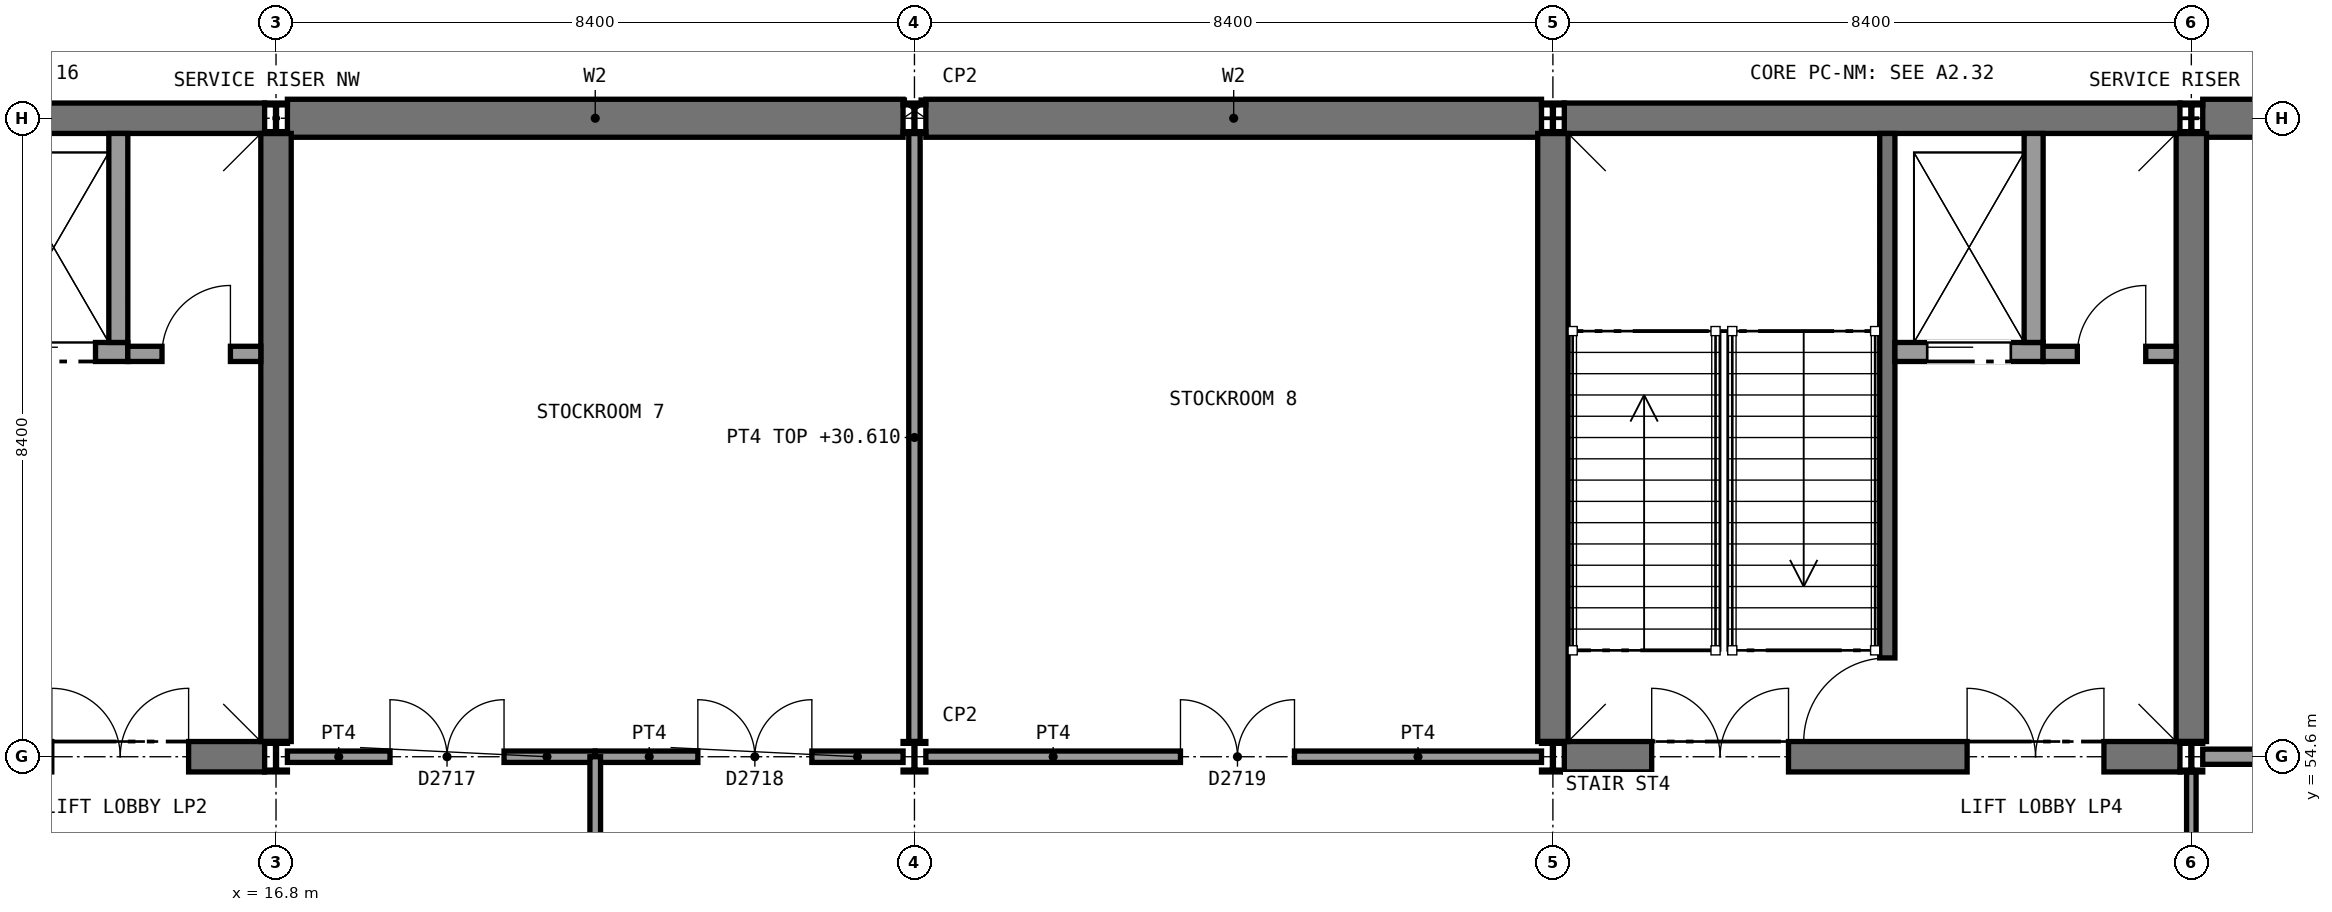
"""IFC4 building model, lengths in metres.
Left out: names, types, materials, properties, quantities, classifications, styles, units other than length and angle.
Written with IfcOpenShell. Run it as: python <this file> out.ifc"""

import sys

from ifc_helpers import new_model, si_unit, direction, frame, frame_2d, origin, origin_2d, place, context, subcontext, project, spatial, rectangle, i_section, extrude, element, fill, save


model = new_model("IFC4")
c1 = context("Model", 3, precision=1e-05, world=origin(), true_north=direction((0.0, 1.0)))
c2 = subcontext(c1, "Body", "Model", "MODEL_VIEW")
j1 = project(units=[si_unit("LENGTHUNIT", "METRE"), si_unit("PLANEANGLEUNIT", "RADIAN")], contexts=[c1])
p1 = place(None, origin())
s1 = spatial("IfcSite", under=j1, at=p1, CompositionType="ELEMENT")
p2 = place(p1, origin())
s2 = spatial("IfcBuilding", under=s1, at=p2, CompositionType="ELEMENT")
p3 = place(p2, frame((0.0, 0.0, 25.8)))
s3 = spatial("IfcBuildingStorey", under=s2, at=p3, CompositionType="ELEMENT", Elevation=25.8)
p4 = place(p3, frame((16.95, 63.0, 0.0), z_axis=(0.0, 0.0, 1.0), x_axis=(1.0, 0.0, 0.0)))
e1 = element("IfcWall", 1, at=p4, inside=s3, PredefinedType="SHEAR", context=c2, shape_type="SweptSolid", body=[
    extrude(rectangle(XDim=8.1, YDim=0.5, at=frame_2d((4.05, 0.0))), origin(), (0.0, 0.0, 1.0), 5.2),
])
p5 = place(p3, frame((25.35, 63.0, 0.0), z_axis=(0.0, 0.0, 1.0), x_axis=(1.0, 0.0, 0.0)))
e2 = element("IfcWall", 2, at=p5, inside=s3, PredefinedType="SHEAR", context=c2, shape_type="SweptSolid", body=[
    extrude(rectangle(XDim=8.1, YDim=0.5, at=frame_2d((4.05, 0.0))), origin(), (0.0, 0.0, 1.0), 5.2),
])
p6 = place(p3, frame((42.15, 63.0, 0.0), z_axis=(0.0, 0.0, 1.0), x_axis=(1.0, 0.0, 0.0)))
e3 = element("IfcWall", 3, at=p6, inside=s3, PredefinedType="SHEAR", context=c2, shape_type="SweptSolid", body=[
    extrude(rectangle(XDim=8.1, YDim=0.5, at=frame_2d((4.05, 0.0))), origin(), (0.0, 0.0, 1.0), 5.2),
])
p7 = place(p3, frame((8.55, 63.0, 0.0), z_axis=(0.0, 0.0, 1.0), x_axis=(1.0, 0.0, 0.0)))
e4 = element("IfcWall", 4, at=p7, inside=s3, PredefinedType="SHEAR", context=c2, shape_type="SweptSolid", body=[
    extrude(rectangle(XDim=8.1, YDim=0.4, at=frame_2d((4.05, 0.0))), origin(), (0.0, 0.0, 1.0), 4.51),
])
p8 = place(p3, frame((8.55, 54.6, 0.0), z_axis=(0.0, 0.0, 1.0), x_axis=(1.0, 0.0, 0.0)))
e5 = element("IfcWall", 5, at=p8, inside=s3, PredefinedType="SHEAR", context=c2, shape_type="SweptSolid", body=[
    extrude(rectangle(XDim=8.1, YDim=0.4, at=frame_2d((4.05, 0.0))), origin(), (0.0, 0.0, 1.0), 4.51),
])
p9 = place(p8, frame((1.15, 0.0, 0.0)))
e6 = element("IfcOpeningElement", 6, at=p9, cuts=e5, PredefinedType="OPENING", context=c2, shape_type="SweptSolid", body=[
    extrude(rectangle(XDim=1.8, YDim=2.1, at=frame_2d((0.9, 1.05))), frame((0.0, 0.21, 0.0), z_axis=(0.0, -1.0, 0.0), x_axis=(1.0, 0.0, 0.0)), (0.0, 0.0, 1.0), 0.42),
])
p10 = place(p8, frame((5.3, 0.0, 0.0)))
e7 = element("IfcOpeningElement", 7, at=p10, cuts=e5, PredefinedType="OPENING", context=c2, shape_type="SweptSolid", body=[
    extrude(rectangle(XDim=1.8, YDim=2.1, at=frame_2d((0.9, 1.05))), frame((0.0, 0.21, 0.0), z_axis=(0.0, -1.0, 0.0), x_axis=(1.0, 0.0, 0.0)), (0.0, 0.0, 1.0), 0.42),
])
p11 = place(p3, frame((16.8, 54.8, 0.0), z_axis=(0.0, 0.0, 1.0), x_axis=(0.0, 1.0, 0.0)))
e8 = element("IfcWall", 8, at=p11, inside=s3, PredefinedType="SHEAR", context=c2, shape_type="SweptSolid", body=[
    extrude(rectangle(XDim=8.0, YDim=0.4, at=frame_2d((4.0, 0.0))), origin(), (0.0, 0.0, 1.0), 5.2),
])
p12 = place(p3, frame((33.75, 63.0, 0.0), z_axis=(0.0, 0.0, 1.0), x_axis=(1.0, 0.0, 0.0)))
e9 = element("IfcWall", 9, at=p12, inside=s3, PredefinedType="SHEAR", context=c2, shape_type="SweptSolid", body=[
    extrude(rectangle(XDim=8.1, YDim=0.4, at=frame_2d((4.05, 0.0))), origin(), (0.0, 0.0, 1.0), 4.51),
])
p13 = place(p3, frame((33.75, 54.6, 0.0), z_axis=(0.0, 0.0, 1.0), x_axis=(1.0, 0.0, 0.0)))
e10 = element("IfcWall", 10, at=p13, inside=s3, PredefinedType="SHEAR", context=c2, shape_type="SweptSolid", body=[
    extrude(rectangle(XDim=8.1, YDim=0.4, at=frame_2d((4.05, 0.0))), origin(), (0.0, 0.0, 1.0), 4.51),
])
p14 = place(p13, frame((1.15, 0.0, 0.0)))
e11 = element("IfcOpeningElement", 11, at=p14, cuts=e10, PredefinedType="OPENING", context=c2, shape_type="SweptSolid", body=[
    extrude(rectangle(XDim=1.8, YDim=2.1, at=frame_2d((0.9, 1.05))), frame((0.0, 0.21, 0.0), z_axis=(0.0, -1.0, 0.0), x_axis=(1.0, 0.0, 0.0)), (0.0, 0.0, 1.0), 0.42),
])
p15 = place(p13, frame((5.3, 0.0, 0.0)))
e12 = element("IfcOpeningElement", 12, at=p15, cuts=e10, PredefinedType="OPENING", context=c2, shape_type="SweptSolid", body=[
    extrude(rectangle(XDim=1.8, YDim=2.1, at=frame_2d((0.9, 1.05))), frame((0.0, 0.21, 0.0), z_axis=(0.0, -1.0, 0.0), x_axis=(1.0, 0.0, 0.0)), (0.0, 0.0, 1.0), 0.42),
])
for number, where, z_axis, x_axis in (
    (13, (33.6, 54.8, 0.0), (0.0, 0.0, 1.0), (0.0, 1.0, 0.0)),
    (14, (42.0, 54.8, 0.0), (0.0, 0.0, 1.0), (0.0, 1.0, 0.0)),
):
    element("IfcWall", number, at=place(p3, frame(where, z_axis=z_axis, x_axis=x_axis)), inside=s3, PredefinedType="SHEAR", context=c2, shape_type="SweptSolid", body=[
        extrude(rectangle(XDim=8.0, YDim=0.4, at=frame_2d((4.0, 0.0))), origin(), (0.0, 0.0, 1.0), 5.2),
    ])
for number, where, z_axis, x_axis in (
    (15, (16.8, 54.6, 0.0), (0.0, 0.0, 1.0), (1.0, 0.0, 0.0)),
    (16, (16.8, 63.0, 0.0), (0.0, 0.0, 1.0), (1.0, 0.0, 0.0)),
    (17, (25.2, 54.6, 0.0), (0.0, 0.0, 1.0), (1.0, 0.0, 0.0)),
    (18, (25.2, 63.0, 0.0), (0.0, 0.0, 1.0), (1.0, 0.0, 0.0)),
    (19, (33.6, 54.6, 0.0), (0.0, 0.0, 1.0), (1.0, 0.0, 0.0)),
    (20, (33.6, 63.0, 0.0), (0.0, 0.0, 1.0), (1.0, 0.0, 0.0)),
    (21, (42.0, 54.6, 0.0), (0.0, 0.0, 1.0), (1.0, 0.0, 0.0)),
    (22, (42.0, 63.0, 0.0), (0.0, 0.0, 1.0), (1.0, 0.0, 0.0)),
):
    element("IfcColumn", number, at=place(p3, frame(where, z_axis=z_axis, x_axis=x_axis)), inside=s3, PredefinedType="COLUMN", context=c2, shape_type="SweptSolid", body=[
        extrude(i_section(OverallWidth=0.3, OverallDepth=0.4, WebThickness=0.013, FlangeThickness=0.024, FilletRadius=0.027, at=origin_2d()), origin(), (0.0, 0.0, 1.0), 5.4),
    ])
p16 = place(p3, frame((25.2, 54.8, 0.0), z_axis=(0.0, 0.0, 1.0), x_axis=(0.0, 1.0, 0.0)))
e23 = element("IfcWall", 23, at=p16, inside=s3, PredefinedType="SOLIDWALL", context=c2, shape_type="SweptSolid", body=[
    extrude(rectangle(XDim=8.0, YDim=0.15, at=frame_2d((4.0, 0.0))), origin(), (0.0, 0.0, 1.0), 4.81),
])
p17 = place(p3, frame((16.95, 54.6, 0.0), z_axis=(0.0, 0.0, 1.0), x_axis=(1.0, 0.0, 0.0)))
e24 = element("IfcWall", 24, at=p17, inside=s3, PredefinedType="SOLIDWALL", context=c2, shape_type="SweptSolid", body=[
    extrude(rectangle(XDim=4.05, YDim=0.15, at=frame_2d((2.025, 0.0))), origin(), (0.0, 0.0, 1.0), 4.89),
])
p18 = place(p17, frame((1.35, 0.0, 0.0)))
e25 = element("IfcOpeningElement", 25, at=p18, cuts=e24, PredefinedType="OPENING", context=c2, shape_type="SweptSolid", body=[
    extrude(rectangle(XDim=1.5, YDim=2.1, at=frame_2d((0.75, 1.05))), frame((0.0, 0.085, 0.0), z_axis=(0.0, -1.0, 0.0), x_axis=(1.0, 0.0, 0.0)), (0.0, 0.0, 1.0), 0.17),
])
p19 = place(p3, frame((21.0, 54.6, 0.0), z_axis=(0.0, 0.0, 1.0), x_axis=(1.0, 0.0, 0.0)))
e26 = element("IfcWall", 26, at=p19, inside=s3, PredefinedType="SOLIDWALL", context=c2, shape_type="SweptSolid", body=[
    extrude(rectangle(XDim=4.05, YDim=0.15, at=frame_2d((2.025, 0.0))), origin(), (0.0, 0.0, 1.0), 4.89),
])
p20 = place(p19, frame((1.35, 0.0, 0.0)))
e27 = element("IfcOpeningElement", 27, at=p20, cuts=e26, PredefinedType="OPENING", context=c2, shape_type="SweptSolid", body=[
    extrude(rectangle(XDim=1.5, YDim=2.1, at=frame_2d((0.75, 1.05))), frame((0.0, 0.085, 0.0), z_axis=(0.0, -1.0, 0.0), x_axis=(1.0, 0.0, 0.0)), (0.0, 0.0, 1.0), 0.17),
])
p21 = place(p3, frame((25.35, 54.6, 0.0), z_axis=(0.0, 0.0, 1.0), x_axis=(1.0, 0.0, 0.0)))
e28 = element("IfcWall", 28, at=p21, inside=s3, PredefinedType="SOLIDWALL", context=c2, shape_type="SweptSolid", body=[
    extrude(rectangle(XDim=8.1, YDim=0.15, at=frame_2d((4.05, 0.0))), origin(), (0.0, 0.0, 1.0), 4.89),
])
p22 = place(p21, frame((3.35, 0.0, 0.0)))
e29 = element("IfcOpeningElement", 29, at=p22, cuts=e28, PredefinedType="OPENING", context=c2, shape_type="SweptSolid", body=[
    extrude(rectangle(XDim=1.5, YDim=2.1, at=frame_2d((0.75, 1.05))), frame((0.0, 0.085, 0.0), z_axis=(0.0, -1.0, 0.0), x_axis=(1.0, 0.0, 0.0)), (0.0, 0.0, 1.0), 0.17),
])
p23 = place(p3, frame((42.15, 54.6, 0.0), z_axis=(0.0, 0.0, 1.0), x_axis=(1.0, 0.0, 0.0)))
e30 = element("IfcWall", 30, at=p23, inside=s3, PredefinedType="SOLIDWALL", context=c2, shape_type="SweptSolid", body=[
    extrude(rectangle(XDim=8.1, YDim=0.2, at=frame_2d((4.05, 0.0))), origin(), (0.0, 0.0, 1.0), 4.89),
])
p24 = place(p23, frame((3.35, 0.0, 0.0)))
e31 = element("IfcOpeningElement", 31, at=p24, cuts=e30, PredefinedType="OPENING", context=c2, shape_type="SweptSolid", body=[
    extrude(rectangle(XDim=1.2, YDim=2.1, at=frame_2d((0.6, 1.05))), frame((0.0, 0.11, 0.0), z_axis=(0.0, -1.0, 0.0), x_axis=(1.0, 0.0, 0.0)), (0.0, 0.0, 1.0), 0.22),
])
p25 = place(p3, frame((21.0, 47.2, 0.0), z_axis=(0.0, 0.0, 1.0), x_axis=(0.0, 1.0, 0.0)))
e32 = element("IfcWall", 32, at=p25, inside=s3, PredefinedType="PARTITIONING", context=c2, shape_type="SweptSolid", body=[
    extrude(rectangle(XDim=7.4, YDim=0.14, at=frame_2d((3.7, 0.0))), origin(), (0.0, 0.0, 1.0), 5.2),
])
p26 = place(p3, frame((42.0, 46.4, 0.0), z_axis=(0.0, 0.0, 1.0), x_axis=(0.0, 1.0, 0.0)))
e33 = element("IfcWall", 33, at=p26, inside=s3, PredefinedType="PARTITIONING", context=c2, shape_type="SweptSolid", body=[
    extrude(rectangle(XDim=8.0, YDim=0.125, at=frame_2d((4.0, 0.0))), origin(), (0.0, 0.0, 1.0), 4.81),
])
p27 = place(p26, frame((3.1, 0.0, 0.0)))
e34 = element("IfcOpeningElement", 34, at=p27, cuts=e33, PredefinedType="OPENING", context=c2, shape_type="SweptSolid", body=[
    extrude(rectangle(XDim=1.8, YDim=2.1, at=frame_2d((0.9, 1.05))), frame((0.0, 0.073, 0.0), z_axis=(0.0, -1.0, 0.0), x_axis=(1.0, 0.0, 0.0)), (0.0, 0.0, 1.0), 0.145),
])
p28 = place(p3, frame((12.9, 59.925, 0.0), z_axis=(0.0, 0.0, 1.0), x_axis=(1.0, 0.0, 0.0)))
e35 = element("IfcWall", 35, at=p28, inside=s3, PredefinedType="SOLIDWALL", context=c2, shape_type="SweptSolid", body=[
    extrude(rectangle(XDim=1.95, YDim=0.25, at=frame_2d((0.975, 0.0))), origin(), (0.0, 0.0, 1.0), 5.2),
])
p29 = place(p28, frame((0.425, 0.0, 0.0)))
e36 = element("IfcOpeningElement", 36, at=p29, cuts=e35, PredefinedType="OPENING", context=c2, shape_type="SweptSolid", body=[
    extrude(rectangle(XDim=1.1, YDim=2.1, at=frame_2d((0.55, 1.05))), frame((0.0, 0.135, 0.0), z_axis=(0.0, -1.0, 0.0), x_axis=(1.0, 0.0, 0.0)), (0.0, 0.0, 1.0), 0.27),
])
p30 = place(p3, frame((14.725, 62.8, 0.0), z_axis=(0.0, 0.0, 1.0), x_axis=(0.0, -1.0, 0.0)))
e37 = element("IfcWall", 37, at=p30, inside=s3, PredefinedType="SOLIDWALL", context=c2, shape_type="SweptSolid", body=[
    extrude(rectangle(XDim=2.75, YDim=0.25, at=frame_2d((1.375, 0.0))), origin(), (0.0, 0.0, 1.0), 5.2),
])
p31 = place(p3, frame((14.85, 59.9, 0.0), z_axis=(0.0, 0.0, 1.0), x_axis=(1.0, 0.0, 0.0)))
e38 = element("IfcWall", 38, at=p31, inside=s3, PredefinedType="PARTITIONING", context=c2, shape_type="SweptSolid", body=[
    extrude(rectangle(XDim=1.75, YDim=0.2, at=frame_2d((0.875, 0.0))), origin(), (0.0, 0.0, 1.0), 5.2),
])
p32 = place(p31, frame((0.45, 0.0, 0.0)))
e39 = element("IfcOpeningElement", 39, at=p32, cuts=e38, PredefinedType="OPENING", context=c2, shape_type="SweptSolid", body=[
    extrude(rectangle(XDim=0.9, YDim=2.1, at=frame_2d((0.45, 1.05))), frame((0.0, 0.11, 0.0), z_axis=(0.0, -1.0, 0.0), x_axis=(1.0, 0.0, 0.0)), (0.0, 0.0, 1.0), 0.22),
])
p33 = place(p3, frame((38.0, 62.8, 0.0), z_axis=(0.0, 0.0, 1.0), x_axis=(0.0, -1.0, 0.0)))
e40 = element("IfcWall", 40, at=p33, inside=s3, PredefinedType="SHEAR", context=c2, shape_type="SweptSolid", body=[
    extrude(rectangle(XDim=8.0, YDim=0.2, at=frame_2d((4.0, 0.0))), origin(), (0.0, 0.0, 1.0), 5.2),
])
p34 = place(p33, frame((6.9, 0.0, 0.0)))
e41 = element("IfcOpeningElement", 41, at=p34, cuts=e40, PredefinedType="OPENING", context=c2, shape_type="SweptSolid", body=[
    extrude(rectangle(XDim=1.11, YDim=2.1, at=frame_2d((0.555, 1.05))), frame((0.0, 0.11, 0.0), z_axis=(0.0, -1.0, 0.0), x_axis=(1.0, 0.0, 0.0)), (0.0, 0.0, 1.0), 0.22),
])
p35 = place(p3, frame((38.1, 59.925, 0.0), z_axis=(0.0, 0.0, 1.0), x_axis=(1.0, 0.0, 0.0)))
e42 = element("IfcWall", 42, at=p35, inside=s3, PredefinedType="SOLIDWALL", context=c2, shape_type="SweptSolid", body=[
    extrude(rectangle(XDim=1.95, YDim=0.25, at=frame_2d((0.975, 0.0))), origin(), (0.0, 0.0, 1.0), 5.2),
])
p36 = place(p35, frame((0.425, 0.0, 0.0)))
e43 = element("IfcOpeningElement", 43, at=p36, cuts=e42, PredefinedType="OPENING", context=c2, shape_type="SweptSolid", body=[
    extrude(rectangle(XDim=1.1, YDim=2.1, at=frame_2d((0.55, 1.05))), frame((0.0, 0.135, 0.0), z_axis=(0.0, -1.0, 0.0), x_axis=(1.0, 0.0, 0.0)), (0.0, 0.0, 1.0), 0.27),
])
p37 = place(p3, frame((39.925, 62.8, 0.0), z_axis=(0.0, 0.0, 1.0), x_axis=(0.0, -1.0, 0.0)))
e44 = element("IfcWall", 44, at=p37, inside=s3, PredefinedType="SOLIDWALL", context=c2, shape_type="SweptSolid", body=[
    extrude(rectangle(XDim=2.75, YDim=0.25, at=frame_2d((1.375, 0.0))), origin(), (0.0, 0.0, 1.0), 5.2),
])
p38 = place(p3, frame((40.05, 59.9, 0.0), z_axis=(0.0, 0.0, 1.0), x_axis=(1.0, 0.0, 0.0)))
e45 = element("IfcWall", 45, at=p38, inside=s3, PredefinedType="PARTITIONING", context=c2, shape_type="SweptSolid", body=[
    extrude(rectangle(XDim=1.75, YDim=0.2, at=frame_2d((0.875, 0.0))), origin(), (0.0, 0.0, 1.0), 5.2),
])
p39 = place(p38, frame((0.45, 0.0, 0.0)))
e46 = element("IfcOpeningElement", 46, at=p39, cuts=e45, PredefinedType="OPENING", context=c2, shape_type="SweptSolid", body=[
    extrude(rectangle(XDim=0.9, YDim=2.1, at=frame_2d((0.45, 1.05))), frame((0.0, 0.11, 0.0), z_axis=(0.0, -1.0, 0.0), x_axis=(1.0, 0.0, 0.0)), (0.0, 0.0, 1.0), 0.22),
])
p40 = place(p18, origin())
e47 = element("IfcDoor", 47, at=p40, inside=s3, OperationType="DOUBLE_DOOR_SINGLE_SWING", PredefinedType="DOOR", context=c2, shape_type="SweptSolid", body=[
    extrude(rectangle(XDim=1.5, YDim=2.1, at=frame_2d((0.75, 1.05))), frame((0.0, 0.025, 0.0), z_axis=(0.0, -1.0, 0.0), x_axis=(1.0, 0.0, 0.0)), (0.0, 0.0, 1.0), 0.05),
])
fill(e25, e47)
p41 = place(p20, origin())
e48 = element("IfcDoor", 48, at=p41, inside=s3, OperationType="DOUBLE_DOOR_SINGLE_SWING", PredefinedType="DOOR", context=c2, shape_type="SweptSolid", body=[
    extrude(rectangle(XDim=1.5, YDim=2.1, at=frame_2d((0.75, 1.05))), frame((0.0, 0.025, 0.0), z_axis=(0.0, -1.0, 0.0), x_axis=(1.0, 0.0, 0.0)), (0.0, 0.0, 1.0), 0.05),
])
fill(e27, e48)
p42 = place(p22, origin())
e49 = element("IfcDoor", 49, at=p42, inside=s3, OperationType="DOUBLE_DOOR_SINGLE_SWING", PredefinedType="DOOR", context=c2, shape_type="SweptSolid", body=[
    extrude(rectangle(XDim=1.5, YDim=2.1, at=frame_2d((0.75, 1.05))), frame((0.0, 0.025, 0.0), z_axis=(0.0, -1.0, 0.0), x_axis=(1.0, 0.0, 0.0)), (0.0, 0.0, 1.0), 0.05),
])
fill(e29, e49)
p43 = place(p29, frame((1.1, 0.0, 0.0), z_axis=(0.0, 0.0, 1.0), x_axis=(-1.0, 0.0, 0.0)))
e50 = element("IfcDoor", 50, at=p43, inside=s3, OperationType="SLIDING_TO_RIGHT", PredefinedType="DOOR", context=c2, shape_type="SweptSolid", body=[
    extrude(rectangle(XDim=1.1, YDim=2.1, at=frame_2d((0.55, 1.05))), frame((0.0, 0.025, 0.0), z_axis=(0.0, -1.0, 0.0), x_axis=(1.0, 0.0, 0.0)), (0.0, 0.0, 1.0), 0.05),
])
fill(e36, e50)
p44 = place(p32, origin())
e51 = element("IfcDoor", 51, at=p44, inside=s3, OperationType="SINGLE_SWING_RIGHT", PredefinedType="DOOR", context=c2, shape_type="SweptSolid", body=[
    extrude(rectangle(XDim=0.9, YDim=2.1, at=frame_2d((0.45, 1.05))), frame((0.0, 0.025, 0.0), z_axis=(0.0, -1.0, 0.0), x_axis=(1.0, 0.0, 0.0)), (0.0, 0.0, 1.0), 0.05),
])
fill(e39, e51)
p45 = place(p10, origin())
e52 = element("IfcDoor", 52, at=p45, inside=s3, OperationType="DOUBLE_DOOR_SINGLE_SWING", PredefinedType="DOOR", context=c2, shape_type="SweptSolid", body=[
    extrude(rectangle(XDim=1.8, YDim=2.1, at=frame_2d((0.9, 1.05))), frame((0.0, 0.025, 0.0), z_axis=(0.0, -1.0, 0.0), x_axis=(1.0, 0.0, 0.0)), (0.0, 0.0, 1.0), 0.05),
])
fill(e7, e52)
p46 = place(p34, frame((1.1, 0.0, 0.0), z_axis=(0.0, 0.0, 1.0), x_axis=(-1.0, 0.0, 0.0)))
e53 = element("IfcDoor", 53, at=p46, inside=s3, OperationType="SINGLE_SWING_LEFT", PredefinedType="DOOR", context=c2, shape_type="SweptSolid", body=[
    extrude(rectangle(XDim=1.1, YDim=2.1, at=frame_2d((0.55, 1.05))), frame((0.0, 0.025, 0.0), z_axis=(0.0, -1.0, 0.0), x_axis=(1.0, 0.0, 0.0)), (0.0, 0.0, 1.0), 0.05),
])
fill(e41, e53)
p47 = place(p36, frame((1.1, 0.0, 0.0), z_axis=(0.0, 0.0, 1.0), x_axis=(-1.0, 0.0, 0.0)))
e54 = element("IfcDoor", 54, at=p47, inside=s3, OperationType="SLIDING_TO_RIGHT", PredefinedType="DOOR", context=c2, shape_type="SweptSolid", body=[
    extrude(rectangle(XDim=1.1, YDim=2.1, at=frame_2d((0.55, 1.05))), frame((0.0, 0.025, 0.0), z_axis=(0.0, -1.0, 0.0), x_axis=(1.0, 0.0, 0.0)), (0.0, 0.0, 1.0), 0.05),
])
fill(e43, e54)
p48 = place(p39, origin())
e55 = element("IfcDoor", 55, at=p48, inside=s3, OperationType="SINGLE_SWING_RIGHT", PredefinedType="DOOR", context=c2, shape_type="SweptSolid", body=[
    extrude(rectangle(XDim=0.9, YDim=2.1, at=frame_2d((0.45, 1.05))), frame((0.0, 0.025, 0.0), z_axis=(0.0, -1.0, 0.0), x_axis=(1.0, 0.0, 0.0)), (0.0, 0.0, 1.0), 0.05),
])
fill(e46, e55)
p49 = place(p14, origin())
e56 = element("IfcDoor", 56, at=p49, inside=s3, OperationType="DOUBLE_DOOR_SINGLE_SWING", PredefinedType="DOOR", context=c2, shape_type="SweptSolid", body=[
    extrude(rectangle(XDim=1.8, YDim=2.1, at=frame_2d((0.9, 1.05))), frame((0.0, 0.025, 0.0), z_axis=(0.0, -1.0, 0.0), x_axis=(1.0, 0.0, 0.0)), (0.0, 0.0, 1.0), 0.05),
])
fill(e11, e56)
p50 = place(p15, origin())
e57 = element("IfcDoor", 57, at=p50, inside=s3, OperationType="DOUBLE_DOOR_SINGLE_SWING", PredefinedType="DOOR", context=c2, shape_type="SweptSolid", body=[
    extrude(rectangle(XDim=1.8, YDim=2.1, at=frame_2d((0.9, 1.05))), frame((0.0, 0.025, 0.0), z_axis=(0.0, -1.0, 0.0), x_axis=(1.0, 0.0, 0.0)), (0.0, 0.0, 1.0), 0.05),
])
fill(e12, e57)
save(model, sys.argv[1])
